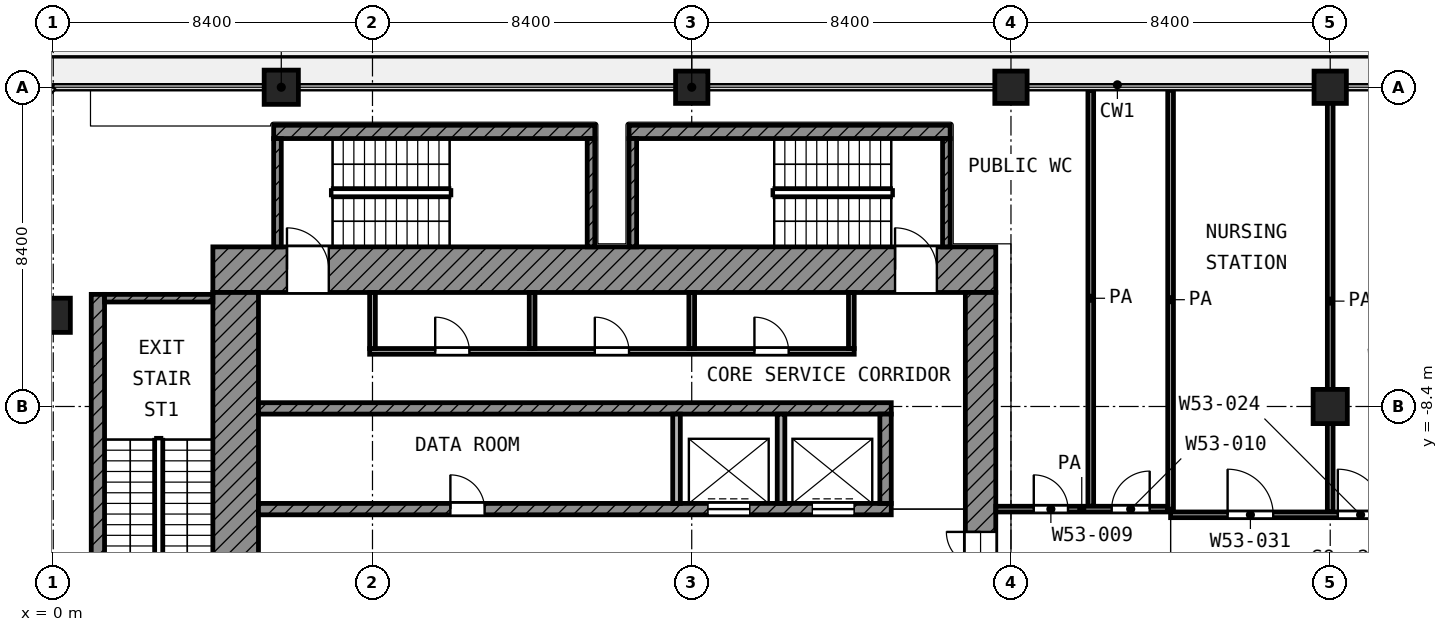
"""IFC4 building model, lengths in metres.
Left out: names, types, materials, properties, quantities, classifications, styles, units other than length and angle.
Written with IfcOpenShell. Run it as: python <this file> out.ifc"""

import sys

from ifc_helpers import new_model, si_unit, direction, frame, frame_2d, origin, origin_2d, place, context, subcontext, project, spatial, rectangle, extrude, element, fill, save


model = new_model("IFC4")
c1 = context("Model", 3, precision=1e-05, world=origin(), true_north=direction((0.0, 1.0)))
c2 = subcontext(c1, "Body", "Model", "MODEL_VIEW")
j1 = project(units=[si_unit("LENGTHUNIT", "METRE"), si_unit("PLANEANGLEUNIT", "RADIAN")], contexts=[c1])
p1 = place(None, origin())
s1 = spatial("IfcSite", under=j1, at=p1, CompositionType="ELEMENT")
p2 = place(p1, origin())
s2 = spatial("IfcBuilding", under=s1, at=p2, CompositionType="ELEMENT")
p3 = place(p2, frame((0.0, 0.0, 230.6)))
s3 = spatial("IfcBuildingStorey", under=s2, at=p3, CompositionType="ELEMENT", Elevation=230.6)
p4 = place(p3, frame((6.0, 0.0, 0.0), z_axis=(0.0, 0.0, 1.0), x_axis=(1.0, 0.0, 0.0)))
e1 = element("IfcColumn", 1, at=p4, inside=s3, PredefinedType="COLUMN", context=c2, shape_type="SweptSolid", body=[
    extrude(rectangle(XDim=0.9, YDim=0.9, at=origin_2d()), origin(), (0.0, 0.0, 1.0), 4.2),
])
for number, where, z_axis, x_axis in (
    (2, (16.8, 0.0, 0.0), (0.0, 0.0, 1.0), (1.0, 0.0, 0.0)),
    (3, (25.2, 0.0, 0.0), (0.0, 0.0, 1.0), (1.0, 0.0, 0.0)),
    (4, (33.6, 0.0, 0.0), (0.0, 0.0, 1.0), (1.0, 0.0, 0.0)),
):
    element("IfcColumn", number, at=place(p3, frame(where, z_axis=z_axis, x_axis=x_axis)), inside=s3, PredefinedType="COLUMN", context=c2, shape_type="SweptSolid", body=[
        extrude(rectangle(XDim=0.85, YDim=0.85, at=origin_2d()), origin(), (0.0, 0.0, 1.0), 4.2),
    ])
for number, where, z_axis, x_axis in (
    (5, (0.0, -6.0, 0.0), (0.0, 0.0, 1.0), (1.0, 0.0, 0.0)),
    (6, (33.6, -8.4, 0.0), (0.0, 0.0, 1.0), (1.0, 0.0, 0.0)),
):
    element("IfcColumn", number, at=place(p3, frame(where, z_axis=z_axis, x_axis=x_axis)), inside=s3, PredefinedType="COLUMN", context=c2, shape_type="SweptSolid", body=[
        extrude(rectangle(XDim=0.9, YDim=0.9, at=origin_2d()), origin(), (0.0, 0.0, 1.0), 4.2),
    ])
p5 = place(p3, frame((4.2, -4.8, 0.0), z_axis=(0.0, 0.0, 1.0), x_axis=(1.0, 0.0, 0.0)))
e7 = element("IfcWall", 7, at=p5, inside=s3, PredefinedType="SHEAR", context=c2, shape_type="SweptSolid", body=[
    extrude(rectangle(XDim=20.6, YDim=1.2, at=frame_2d((10.3, 0.0))), origin(), (0.0, 0.0, 1.0), 3.6),
])
p6 = place(p5, frame((1.95, 0.0, 0.0)))
e8 = element("IfcOpeningElement", 8, at=p6, cuts=e7, PredefinedType="OPENING", context=c2, shape_type="SweptSolid", body=[
    extrude(rectangle(XDim=1.1, YDim=2.1, at=frame_2d((0.55, 1.05))), frame((0.0, 0.61, 0.0), z_axis=(0.0, -1.0, 0.0), x_axis=(1.0, 0.0, 0.0)), (0.0, 0.0, 1.0), 1.22),
])
p7 = place(p5, frame((17.95, 0.0, 0.0)))
e9 = element("IfcOpeningElement", 9, at=p7, cuts=e7, PredefinedType="OPENING", context=c2, shape_type="SweptSolid", body=[
    extrude(rectangle(XDim=1.1, YDim=2.1, at=frame_2d((0.55, 1.05))), frame((0.0, 0.61, 0.0), z_axis=(0.0, -1.0, 0.0), x_axis=(1.0, 0.0, 0.0)), (0.0, 0.0, 1.0), 1.22),
])
p8 = place(p3, frame((4.8, -24.8, 0.0), z_axis=(0.0, 0.0, 1.0), x_axis=(0.0, 1.0, 0.0)))
e10 = element("IfcWall", 10, at=p8, inside=s3, PredefinedType="SHEAR", context=c2, shape_type="SweptSolid", body=[
    extrude(rectangle(XDim=19.4, YDim=1.2, at=frame_2d((9.7, 0.0))), origin(), (0.0, 0.0, 1.0), 3.6),
])
p9 = place(p8, frame((11.25, 0.0, 0.0)))
e11 = element("IfcOpeningElement", 11, at=p9, cuts=e10, PredefinedType="OPENING", context=c2, shape_type="SweptSolid", body=[
    extrude(rectangle(XDim=1.1, YDim=2.1, at=frame_2d((0.55, 1.05))), frame((0.0, 0.61, 0.0), z_axis=(0.0, -1.0, 0.0), x_axis=(1.0, 0.0, 0.0)), (0.0, 0.0, 1.0), 1.22),
])
p10 = place(p8, frame((1.95, 0.0, 0.0)))
e12 = element("IfcOpeningElement", 12, at=p10, cuts=e10, PredefinedType="OPENING", context=c2, shape_type="SweptSolid", body=[
    extrude(rectangle(XDim=1.1, YDim=2.1, at=frame_2d((0.55, 1.05))), frame((0.0, 0.61, 0.0), z_axis=(0.0, -1.0, 0.0), x_axis=(1.0, 0.0, 0.0)), (0.0, 0.0, 1.0), 1.22),
])
p11 = place(p3, frame((24.4, -24.0, 0.0), z_axis=(0.0, 0.0, 1.0), x_axis=(0.0, 1.0, 0.0)))
e13 = element("IfcWall", 13, at=p11, inside=s3, PredefinedType="SHEAR", context=c2, shape_type="SweptSolid", body=[
    extrude(rectangle(XDim=18.6, YDim=0.8, at=frame_2d((9.3, 0.0))), origin(), (0.0, 0.0, 1.0), 3.6),
])
p12 = place(p11, frame((10.5, 0.0, 0.0)))
e14 = element("IfcOpeningElement", 14, at=p12, cuts=e13, PredefinedType="OPENING", context=c2, shape_type="SweptSolid", body=[
    extrude(rectangle(XDim=1.8, YDim=2.1, at=frame_2d((0.9, 1.05))), frame((0.0, 0.41, 0.0), z_axis=(0.0, -1.0, 0.0), x_axis=(1.0, 0.0, 0.0)), (0.0, 0.0, 1.0), 0.82),
])
p13 = place(p3, frame((5.4, -8.45, 0.0), z_axis=(0.0, 0.0, 1.0), x_axis=(1.0, 0.0, 0.0)))
e15 = element("IfcWall", 15, at=p13, inside=s3, PredefinedType="SHEAR", context=c2, shape_type="SweptSolid", body=[
    extrude(rectangle(XDim=16.65, YDim=0.3, at=frame_2d((8.325, 0.0))), origin(), (0.0, 0.0, 1.0), 3.6),
])
p14 = place(p3, frame((5.4, -11.1, 0.0), z_axis=(0.0, 0.0, 1.0), x_axis=(1.0, 0.0, 0.0)))
e16 = element("IfcWall", 16, at=p14, inside=s3, PredefinedType="SHEAR", context=c2, shape_type="SweptSolid", body=[
    extrude(rectangle(XDim=16.65, YDim=0.3, at=frame_2d((8.325, 0.0))), origin(), (0.0, 0.0, 1.0), 3.6),
])
p15 = place(p14, frame((11.825, 0.0, 0.0)))
e17 = element("IfcOpeningElement", 17, at=p15, cuts=e16, PredefinedType="OPENING", context=c2, shape_type="SweptSolid", body=[
    extrude(rectangle(XDim=1.1, YDim=2.1, at=frame_2d((0.55, 1.05))), frame((0.0, 0.16, 0.0), z_axis=(0.0, -1.0, 0.0), x_axis=(1.0, 0.0, 0.0)), (0.0, 0.0, 1.0), 0.32),
])
p16 = place(p14, frame((14.575, 0.0, 0.0)))
e18 = element("IfcOpeningElement", 18, at=p16, cuts=e16, PredefinedType="OPENING", context=c2, shape_type="SweptSolid", body=[
    extrude(rectangle(XDim=1.1, YDim=2.1, at=frame_2d((0.55, 1.05))), frame((0.0, 0.16, 0.0), z_axis=(0.0, -1.0, 0.0), x_axis=(1.0, 0.0, 0.0)), (0.0, 0.0, 1.0), 0.32),
])
p17 = place(p14, frame((5.05, 0.0, 0.0)))
e19 = element("IfcOpeningElement", 19, at=p17, cuts=e16, PredefinedType="OPENING", context=c2, shape_type="SweptSolid", body=[
    extrude(rectangle(XDim=0.9, YDim=2.1, at=frame_2d((0.45, 1.05))), frame((0.0, 0.16, 0.0), z_axis=(0.0, -1.0, 0.0), x_axis=(1.0, 0.0, 0.0)), (0.0, 0.0, 1.0), 0.32),
])
p18 = place(p3, frame((21.9, -10.95, 0.0), z_axis=(0.0, 0.0, 1.0), x_axis=(0.0, 1.0, 0.0)))
e20 = element("IfcWall", 20, at=p18, inside=s3, PredefinedType="SHEAR", context=c2, shape_type="SweptSolid", body=[
    extrude(rectangle(XDim=2.35, YDim=0.3, at=frame_2d((1.175, 0.0))), origin(), (0.0, 0.0, 1.0), 3.6),
])
for number, where, z_axis, x_axis in (
    (21, (16.4, -10.95, 0.0), (0.0, 0.0, 1.0), (0.0, 1.0, 0.0)),
    (22, (19.15, -10.95, 0.0), (0.0, 0.0, 1.0), (0.0, 1.0, 0.0)),
):
    element("IfcWall", number, at=place(p3, frame(where, z_axis=z_axis, x_axis=x_axis)), inside=s3, PredefinedType="PARTITIONING", context=c2, shape_type="SweptSolid", body=[
        extrude(rectangle(XDim=2.35, YDim=0.2, at=frame_2d((1.175, 0.0))), origin(), (0.0, 0.0, 1.0), 3.6),
    ])
p19 = place(p3, frame((8.325, -6.95, 0.0), z_axis=(0.0, 0.0, 1.0), x_axis=(1.0, 0.0, 0.0)))
e23 = element("IfcWall", 23, at=p19, inside=s3, PredefinedType="PARTITIONING", context=c2, shape_type="SweptSolid", body=[
    extrude(rectangle(XDim=12.75, YDim=0.15, at=frame_2d((6.375, 0.0))), origin(), (0.0, 0.0, 1.0), 3.6),
])
p20 = place(p19, frame((1.725, 0.0, 0.0)))
e24 = element("IfcOpeningElement", 24, at=p20, cuts=e23, PredefinedType="OPENING", context=c2, shape_type="SweptSolid", body=[
    extrude(rectangle(XDim=0.9, YDim=2.1, at=frame_2d((0.45, 1.05))), frame((0.0, 0.085, 0.0), z_axis=(0.0, -1.0, 0.0), x_axis=(1.0, 0.0, 0.0)), (0.0, 0.0, 1.0), 0.17),
])
p21 = place(p19, frame((5.925, 0.0, 0.0)))
e25 = element("IfcOpeningElement", 25, at=p21, cuts=e23, PredefinedType="OPENING", context=c2, shape_type="SweptSolid", body=[
    extrude(rectangle(XDim=0.9, YDim=2.1, at=frame_2d((0.45, 1.05))), frame((0.0, 0.085, 0.0), z_axis=(0.0, -1.0, 0.0), x_axis=(1.0, 0.0, 0.0)), (0.0, 0.0, 1.0), 0.17),
])
p22 = place(p19, frame((10.125, 0.0, 0.0)))
e26 = element("IfcOpeningElement", 26, at=p22, cuts=e23, PredefinedType="OPENING", context=c2, shape_type="SweptSolid", body=[
    extrude(rectangle(XDim=0.9, YDim=2.1, at=frame_2d((0.45, 1.05))), frame((0.0, 0.085, 0.0), z_axis=(0.0, -1.0, 0.0), x_axis=(1.0, 0.0, 0.0)), (0.0, 0.0, 1.0), 0.17),
])
for number, where, z_axis, x_axis in (
    (27, (8.4, -6.875, 0.0), (0.0, 0.0, 1.0), (0.0, 1.0, 0.0)),
    (28, (12.6, -6.875, 0.0), (0.0, 0.0, 1.0), (0.0, 1.0, 0.0)),
    (29, (16.8, -6.875, 0.0), (0.0, 0.0, 1.0), (0.0, 1.0, 0.0)),
    (30, (21.0, -6.875, 0.0), (0.0, 0.0, 1.0), (0.0, 1.0, 0.0)),
):
    element("IfcWall", number, at=place(p3, frame(where, z_axis=z_axis, x_axis=x_axis)), inside=s3, PredefinedType="PARTITIONING", context=c2, shape_type="SweptSolid", body=[
        extrude(rectangle(XDim=1.475, YDim=0.15, at=frame_2d((0.738, 0.0))), origin(), (0.0, 0.0, 1.0), 3.6),
    ])
p23 = place(p3, frame((1.175, -13.9, 0.0), z_axis=(0.0, 0.0, 1.0), x_axis=(0.0, 1.0, 0.0)))
e31 = element("IfcWall", 31, at=p23, inside=s3, PredefinedType="SHEAR", context=c2, shape_type="SweptSolid", body=[
    extrude(rectangle(XDim=8.45, YDim=0.35, at=frame_2d((4.225, 0.0))), origin(), (0.0, 0.0, 1.0), 3.6),
])
p24 = place(p3, frame((1.35, -5.55, 0.0), z_axis=(0.0, 0.0, 1.0), x_axis=(1.0, 0.0, 0.0)))
e32 = element("IfcWall", 32, at=p24, inside=s3, PredefinedType="SHEAR", context=c2, shape_type="SweptSolid", body=[
    extrude(rectangle(XDim=2.85, YDim=0.2, at=frame_2d((1.425, 0.0))), origin(), (0.0, 0.0, 1.0), 3.6),
])
p25 = place(p3, frame((5.8, -1.175, 0.0), z_axis=(0.0, 0.0, 1.0), x_axis=(1.0, 0.0, 0.0)))
e33 = element("IfcWall", 33, at=p25, inside=s3, PredefinedType="SHEAR", context=c2, shape_type="SweptSolid", body=[
    extrude(rectangle(XDim=8.45, YDim=0.35, at=frame_2d((4.225, 0.0))), origin(), (0.0, 0.0, 1.0), 3.6),
])
for number, where, z_axis, x_axis in (
    (34, (5.9, -4.2, 0.0), (0.0, 0.0, 1.0), (0.0, 1.0, 0.0)),
    (35, (14.15, -4.2, 0.0), (0.0, 0.0, 1.0), (0.0, 1.0, 0.0)),
):
    element("IfcWall", number, at=place(p3, frame(where, z_axis=z_axis, x_axis=x_axis)), inside=s3, PredefinedType="SHEAR", context=c2, shape_type="SweptSolid", body=[
        extrude(rectangle(XDim=2.85, YDim=0.2, at=frame_2d((1.425, 0.0))), origin(), (0.0, 0.0, 1.0), 3.6),
    ])
p26 = place(p3, frame((15.15, -1.175, 0.0), z_axis=(0.0, 0.0, 1.0), x_axis=(1.0, 0.0, 0.0)))
e36 = element("IfcWall", 36, at=p26, inside=s3, PredefinedType="SHEAR", context=c2, shape_type="SweptSolid", body=[
    extrude(rectangle(XDim=8.45, YDim=0.35, at=frame_2d((4.225, 0.0))), origin(), (0.0, 0.0, 1.0), 3.6),
])
for number, where, z_axis, x_axis in (
    (37, (15.25, -4.2, 0.0), (0.0, 0.0, 1.0), (0.0, 1.0, 0.0)),
    (38, (23.5, -4.2, 0.0), (0.0, 0.0, 1.0), (0.0, 1.0, 0.0)),
):
    element("IfcWall", number, at=place(p3, frame(where, z_axis=z_axis, x_axis=x_axis)), inside=s3, PredefinedType="SHEAR", context=c2, shape_type="SweptSolid", body=[
        extrude(rectangle(XDim=2.85, YDim=0.2, at=frame_2d((1.425, 0.0))), origin(), (0.0, 0.0, 1.0), 3.6),
    ])
p27 = place(p3, frame((29.4, -11.25, 0.0), z_axis=(0.0, 0.0, 1.0), x_axis=(1.0, 0.0, 0.0)))
e39 = element("IfcWall", 39, at=p27, inside=s3, PredefinedType="PARTITIONING", context=c2, shape_type="SweptSolid", body=[
    extrude(rectangle(XDim=10.832, YDim=0.15, at=frame_2d((5.416, 0.0))), origin(), (0.0, 0.0, 1.0), 3.6),
])
p28 = place(p27, frame((4.4, 0.0, 0.0)))
e40 = element("IfcOpeningElement", 40, at=p28, cuts=e39, PredefinedType="OPENING", context=c2, shape_type="SweptSolid", body=[
    extrude(rectangle(XDim=1.2, YDim=2.1, at=frame_2d((0.6, 1.05))), frame((0.0, 0.085, 0.0), z_axis=(0.0, -1.0, 0.0), x_axis=(1.0, 0.0, 0.0)), (0.0, 0.0, 1.0), 0.17),
])
p29 = place(p27, frame((1.5, 0.0, 0.0)))
e41 = element("IfcOpeningElement", 41, at=p29, cuts=e39, PredefinedType="OPENING", context=c2, shape_type="SweptSolid", body=[
    extrude(rectangle(XDim=1.2, YDim=2.1, at=frame_2d((0.6, 1.05))), frame((0.0, 0.085, 0.0), z_axis=(0.0, -1.0, 0.0), x_axis=(1.0, 0.0, 0.0)), (0.0, 0.0, 1.0), 0.17),
])
p30 = place(p3, frame((24.8, -11.1, 0.0), z_axis=(0.0, 0.0, 1.0), x_axis=(1.0, 0.0, 0.0)))
e42 = element("IfcWall", 42, at=p30, inside=s3, PredefinedType="PARTITIONING", context=c2, shape_type="SweptSolid", body=[
    extrude(rectangle(XDim=4.525, YDim=0.15, at=frame_2d((2.262, 0.0))), origin(), (0.0, 0.0, 1.0), 3.6),
])
p31 = place(p30, frame((1.0, 0.0, 0.0)))
e43 = element("IfcOpeningElement", 43, at=p31, cuts=e42, PredefinedType="OPENING", context=c2, shape_type="SweptSolid", body=[
    extrude(rectangle(XDim=0.9, YDim=2.1, at=frame_2d((0.45, 1.05))), frame((0.0, 0.085, 0.0), z_axis=(0.0, -1.0, 0.0), x_axis=(1.0, 0.0, 0.0)), (0.0, 0.0, 1.0), 0.17),
])
p32 = place(p30, frame((3.05, 0.0, 0.0)))
e44 = element("IfcOpeningElement", 44, at=p32, cuts=e42, PredefinedType="OPENING", context=c2, shape_type="SweptSolid", body=[
    extrude(rectangle(XDim=1.0, YDim=2.1, at=frame_2d((0.5, 1.05))), frame((0.0, 0.085, 0.0), z_axis=(0.0, -1.0, 0.0), x_axis=(1.0, 0.0, 0.0)), (0.0, 0.0, 1.0), 0.17),
])
p33 = place(p3, frame((27.3, -11.025, 0.0), z_axis=(0.0, 0.0, 1.0), x_axis=(0.0, 1.0, 0.0)))
e45 = element("IfcWall", 45, at=p33, inside=s3, PredefinedType="PARTITIONING", context=c2, shape_type="SweptSolid", body=[
    extrude(rectangle(XDim=10.945, YDim=0.15, at=frame_2d((5.472, 0.0))), origin(), (0.0, 0.0, 1.0), 3.6),
])
p34 = place(p3, frame((29.4, -11.1, 0.0), z_axis=(0.0, 0.0, 1.0), x_axis=(0.0, 1.0, 0.0)))
e46 = element("IfcWall", 46, at=p34, inside=s3, PredefinedType="PARTITIONING", context=c2, shape_type="SweptSolid", body=[
    extrude(rectangle(XDim=11.02, YDim=0.15, at=frame_2d((5.51, 0.0))), origin(), (0.0, 0.0, 1.0), 3.6),
])
p35 = place(p3, frame((33.6, -11.175, 0.0), z_axis=(0.0, 0.0, 1.0), x_axis=(0.0, 1.0, 0.0)))
e47 = element("IfcWall", 47, at=p35, inside=s3, PredefinedType="PARTITIONING", context=c2, shape_type="SweptSolid", body=[
    extrude(rectangle(XDim=11.095, YDim=0.15, at=frame_2d((5.547, 0.0))), origin(), (0.0, 0.0, 1.0), 3.6),
])
p36 = place(p15, origin())
e48 = element("IfcDoor", 48, at=p36, inside=s3, OperationType="DOUBLE_DOOR_SLIDING", PredefinedType="DOOR", context=c2, shape_type="SweptSolid", body=[
    extrude(rectangle(XDim=1.1, YDim=2.1, at=frame_2d((0.55, 1.05))), frame((0.0, 0.025, 0.0), z_axis=(0.0, -1.0, 0.0), x_axis=(1.0, 0.0, 0.0)), (0.0, 0.0, 1.0), 0.05),
])
fill(e17, e48)
p37 = place(p16, origin())
e49 = element("IfcDoor", 49, at=p37, inside=s3, OperationType="DOUBLE_DOOR_SLIDING", PredefinedType="DOOR", context=c2, shape_type="SweptSolid", body=[
    extrude(rectangle(XDim=1.1, YDim=2.1, at=frame_2d((0.55, 1.05))), frame((0.0, 0.025, 0.0), z_axis=(0.0, -1.0, 0.0), x_axis=(1.0, 0.0, 0.0)), (0.0, 0.0, 1.0), 0.05),
])
fill(e18, e49)
p38 = place(p6, origin())
e50 = element("IfcDoor", 50, at=p38, inside=s3, OperationType="SINGLE_SWING_LEFT", PredefinedType="DOOR", context=c2, shape_type="SweptSolid", body=[
    extrude(rectangle(XDim=1.1, YDim=2.1, at=frame_2d((0.55, 1.05))), frame((0.0, 0.025, 0.0), z_axis=(0.0, -1.0, 0.0), x_axis=(1.0, 0.0, 0.0)), (0.0, 0.0, 1.0), 0.05),
])
fill(e8, e50)
p39 = place(p7, origin())
e51 = element("IfcDoor", 51, at=p39, inside=s3, OperationType="SINGLE_SWING_LEFT", PredefinedType="DOOR", context=c2, shape_type="SweptSolid", body=[
    extrude(rectangle(XDim=1.1, YDim=2.1, at=frame_2d((0.55, 1.05))), frame((0.0, 0.025, 0.0), z_axis=(0.0, -1.0, 0.0), x_axis=(1.0, 0.0, 0.0)), (0.0, 0.0, 1.0), 0.05),
])
fill(e9, e51)
p40 = place(p12, origin())
e52 = element("IfcDoor", 52, at=p40, inside=s3, OperationType="DOUBLE_DOOR_SINGLE_SWING", PredefinedType="DOOR", context=c2, shape_type="SweptSolid", body=[
    extrude(rectangle(XDim=1.8, YDim=2.1, at=frame_2d((0.9, 1.05))), frame((0.0, 0.025, 0.0), z_axis=(0.0, -1.0, 0.0), x_axis=(1.0, 0.0, 0.0)), (0.0, 0.0, 1.0), 0.05),
])
fill(e14, e52)
p41 = place(p20, origin())
e53 = element("IfcDoor", 53, at=p41, inside=s3, OperationType="SINGLE_SWING_LEFT", PredefinedType="DOOR", context=c2, shape_type="SweptSolid", body=[
    extrude(rectangle(XDim=0.9, YDim=2.1, at=frame_2d((0.45, 1.05))), frame((0.0, 0.025, 0.0), z_axis=(0.0, -1.0, 0.0), x_axis=(1.0, 0.0, 0.0)), (0.0, 0.0, 1.0), 0.05),
])
fill(e24, e53)
p42 = place(p21, origin())
e54 = element("IfcDoor", 54, at=p42, inside=s3, OperationType="SINGLE_SWING_LEFT", PredefinedType="DOOR", context=c2, shape_type="SweptSolid", body=[
    extrude(rectangle(XDim=0.9, YDim=2.1, at=frame_2d((0.45, 1.05))), frame((0.0, 0.025, 0.0), z_axis=(0.0, -1.0, 0.0), x_axis=(1.0, 0.0, 0.0)), (0.0, 0.0, 1.0), 0.05),
])
fill(e25, e54)
p43 = place(p22, origin())
e55 = element("IfcDoor", 55, at=p43, inside=s3, OperationType="SINGLE_SWING_LEFT", PredefinedType="DOOR", context=c2, shape_type="SweptSolid", body=[
    extrude(rectangle(XDim=0.9, YDim=2.1, at=frame_2d((0.45, 1.05))), frame((0.0, 0.025, 0.0), z_axis=(0.0, -1.0, 0.0), x_axis=(1.0, 0.0, 0.0)), (0.0, 0.0, 1.0), 0.05),
])
fill(e26, e55)
p44 = place(p17, origin())
e56 = element("IfcDoor", 56, at=p44, inside=s3, OperationType="SINGLE_SWING_LEFT", PredefinedType="DOOR", context=c2, shape_type="SweptSolid", body=[
    extrude(rectangle(XDim=0.9, YDim=2.1, at=frame_2d((0.45, 1.05))), frame((0.0, 0.025, 0.0), z_axis=(0.0, -1.0, 0.0), x_axis=(1.0, 0.0, 0.0)), (0.0, 0.0, 1.0), 0.05),
])
fill(e19, e56)
p45 = place(p28, origin())
e57 = element("IfcDoor", 57, at=p45, inside=s3, OperationType="SINGLE_SWING_LEFT", PredefinedType="DOOR", context=c2, shape_type="SweptSolid", body=[
    extrude(rectangle(XDim=1.2, YDim=2.1, at=frame_2d((0.6, 1.05))), frame((0.0, 0.025, 0.0), z_axis=(0.0, -1.0, 0.0), x_axis=(1.0, 0.0, 0.0)), (0.0, 0.0, 1.0), 0.05),
])
fill(e40, e57)
p46 = place(p31, origin())
e58 = element("IfcDoor", 58, at=p46, inside=s3, OperationType="SINGLE_SWING_LEFT", PredefinedType="DOOR", context=c2, shape_type="SweptSolid", body=[
    extrude(rectangle(XDim=0.9, YDim=2.1, at=frame_2d((0.45, 1.05))), frame((0.0, 0.025, 0.0), z_axis=(0.0, -1.0, 0.0), x_axis=(1.0, 0.0, 0.0)), (0.0, 0.0, 1.0), 0.05),
])
fill(e43, e58)
p47 = place(p32, origin())
e59 = element("IfcDoor", 59, at=p47, inside=s3, OperationType="SINGLE_SWING_RIGHT", PredefinedType="DOOR", context=c2, shape_type="SweptSolid", body=[
    extrude(rectangle(XDim=1.0, YDim=2.1, at=frame_2d((0.5, 1.05))), frame((0.0, 0.025, 0.0), z_axis=(0.0, -1.0, 0.0), x_axis=(1.0, 0.0, 0.0)), (0.0, 0.0, 1.0), 0.05),
])
fill(e44, e59)
p48 = place(p29, origin())
e60 = element("IfcDoor", 60, at=p48, inside=s3, OperationType="SINGLE_SWING_LEFT", PredefinedType="DOOR", context=c2, shape_type="SweptSolid", body=[
    extrude(rectangle(XDim=1.2, YDim=2.1, at=frame_2d((0.6, 1.05))), frame((0.0, 0.025, 0.0), z_axis=(0.0, -1.0, 0.0), x_axis=(1.0, 0.0, 0.0)), (0.0, 0.0, 1.0), 0.05),
])
fill(e41, e60)
save(model, sys.argv[1])
